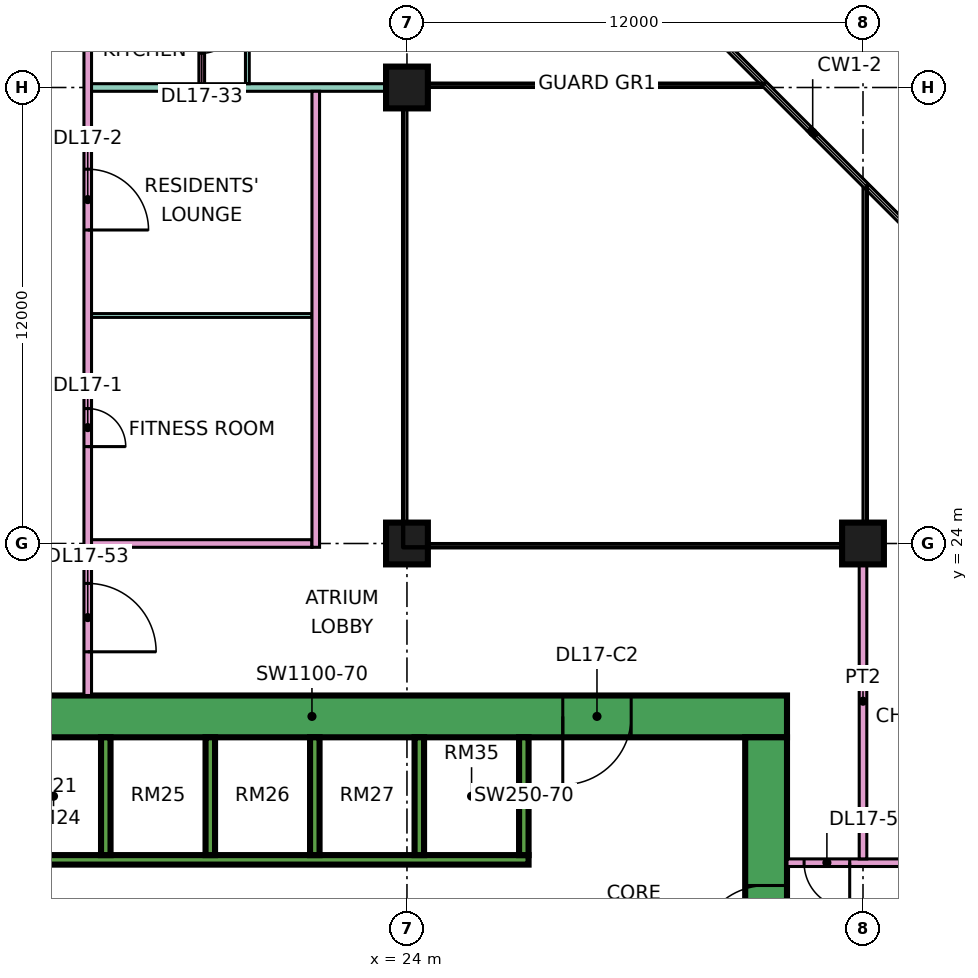
"""IFC4 building model, lengths in metres.
Left out: names, types, materials, properties, quantities, classifications, styles, units other than length and angle.
Written with IfcOpenShell. Run it as: python <this file> out.ifc"""

import sys

from ifc_helpers import new_model, si_unit, direction, frame, frame_2d, origin, origin_2d, place, context, subcontext, project, spatial, rectangle, extrude, element, fill, save


model = new_model("IFC4")
c1 = context("Model", 3, precision=1e-05, world=origin(), true_north=direction((0.0, 1.0)))
c2 = subcontext(c1, "Body", "Model", "MODEL_VIEW")
j1 = project(units=[si_unit("LENGTHUNIT", "METRE"), si_unit("PLANEANGLEUNIT", "RADIAN")], contexts=[c1])
p1 = place(None, origin())
s1 = spatial("IfcSite", under=j1, at=p1, CompositionType="ELEMENT")
p2 = place(p1, origin())
s2 = spatial("IfcBuilding", under=s1, at=p2, CompositionType="ELEMENT")
p3 = place(p2, frame((0.0, 0.0, 78.9)))
s3 = spatial("IfcBuildingStorey", under=s2, at=p3, CompositionType="ELEMENT", Elevation=78.9)
for number, where, z_axis, x_axis in (
    (1, (24.0, 24.0, 0.0), (0.0, 0.0, 1.0), (1.0, 0.0, 0.0)),
    (2, (24.0, 36.0, 0.0), (0.0, 0.0, 1.0), (1.0, 0.0, 0.0)),
    (3, (36.0, 24.0, 0.0), (0.0, 0.0, 1.0), (1.0, 0.0, 0.0)),
):
    element("IfcColumn", number, at=place(p3, frame(where, z_axis=z_axis, x_axis=x_axis)), inside=s3, PredefinedType="COLUMN", context=c2, shape_type="SweptSolid", body=[
        extrude(rectangle(XDim=1.1, YDim=1.1, at=origin_2d()), origin(), (0.0, 0.0, 1.0), 3.75),
    ])
p4 = place(p3, frame((9.0, 19.45, 0.0), z_axis=(0.0, 0.0, 1.0), x_axis=(1.0, 0.0, 0.0)))
e4 = element("IfcWall", 4, at=p4, inside=s3, PredefinedType="SHEAR", context=c2, shape_type="SweptSolid", body=[
    extrude(rectangle(XDim=25.0, YDim=1.1, at=frame_2d((12.5, 0.0))), origin(), (0.0, 0.0, 1.0), 3.75),
])
p5 = place(p4, frame((19.1, 0.0, 0.0)))
e5 = element("IfcOpeningElement", 5, at=p5, cuts=e4, PredefinedType="OPENING", context=c2, shape_type="SweptSolid", body=[
    extrude(rectangle(XDim=1.8, YDim=2.4, at=frame_2d((0.9, 1.2))), frame((0.0, 0.56, 0.0), z_axis=(0.0, -1.0, 0.0), x_axis=(1.0, 0.0, 0.0)), (0.0, 0.0, 1.0), 1.12),
])
p6 = place(p3, frame((33.45, 8.1, 0.0), z_axis=(0.0, 0.0, 1.0), x_axis=(0.0, 1.0, 0.0)))
e6 = element("IfcWall", 6, at=p6, inside=s3, PredefinedType="SHEAR", context=c2, shape_type="SweptSolid", body=[
    extrude(rectangle(XDim=10.8, YDim=1.1, at=frame_2d((5.4, 0.0))), origin(), (0.0, 0.0, 1.0), 3.75),
])
p7 = place(p6, frame((5.1, 0.0, 0.0)))
e7 = element("IfcOpeningElement", 7, at=p7, cuts=e6, PredefinedType="OPENING", context=c2, shape_type="SweptSolid", body=[
    extrude(rectangle(XDim=1.8, YDim=2.4, at=frame_2d((0.9, 1.2))), frame((0.0, 0.56, 0.0), z_axis=(0.0, -1.0, 0.0), x_axis=(1.0, 0.0, 0.0)), (0.0, 0.0, 1.0), 1.12),
])
p8 = place(p3, frame((13.45, 15.675, 0.0), z_axis=(0.0, 0.0, 1.0), x_axis=(1.0, 0.0, 0.0)))
e8 = element("IfcWall", 8, at=p8, inside=s3, PredefinedType="SHEAR", context=c2, shape_type="SweptSolid", body=[
    extrude(rectangle(XDim=13.75, YDim=0.25, at=frame_2d((6.875, 0.0))), origin(), (0.0, 0.0, 1.0), 3.75),
])
for number, where, z_axis, x_axis in (
    (9, (16.075, 15.8, 0.0), (0.0, 0.0, 1.0), (0.0, 1.0, 0.0)),
    (10, (18.825, 15.8, 0.0), (0.0, 0.0, 1.0), (0.0, 1.0, 0.0)),
    (11, (21.575, 15.8, 0.0), (0.0, 0.0, 1.0), (0.0, 1.0, 0.0)),
    (12, (24.325, 15.8, 0.0), (0.0, 0.0, 1.0), (0.0, 1.0, 0.0)),
    (13, (27.075, 15.8, 0.0), (0.0, 0.0, 1.0), (0.0, 1.0, 0.0)),
):
    element("IfcWall", number, at=place(p3, frame(where, z_axis=z_axis, x_axis=x_axis)), inside=s3, PredefinedType="SHEAR", context=c2, shape_type="SweptSolid", body=[
        extrude(rectangle(XDim=3.1, YDim=0.25, at=frame_2d((1.55, 0.0))), origin(), (0.0, 0.0, 1.0), 3.75),
    ])
p9 = place(p3, frame((15.6, 20.0, 0.0), z_axis=(0.0, 0.0, 1.0), x_axis=(0.0, 1.0, 0.0)))
e14 = element("IfcWall", 14, at=p9, inside=s3, PredefinedType="PARTITIONING", context=c2, shape_type="SweptSolid", body=[
    extrude(rectangle(XDim=27.775, YDim=0.2, at=frame_2d((13.887, 0.0))), origin(), (0.0, 0.0, 1.0), 3.35),
])
p10 = place(p9, frame((6.55, 0.0, 0.0)))
e15 = element("IfcOpeningElement", 15, at=p10, cuts=e14, PredefinedType="OPENING", context=c2, shape_type="SweptSolid", body=[
    extrude(rectangle(XDim=1.0, YDim=2.1, at=frame_2d((0.5, 1.05))), frame((0.0, 0.11, 0.0), z_axis=(0.0, -1.0, 0.0), x_axis=(1.0, 0.0, 0.0)), (0.0, 0.0, 1.0), 0.22),
])
p11 = place(p9, frame((12.25, 0.0, 0.0)))
e16 = element("IfcOpeningElement", 16, at=p11, cuts=e14, PredefinedType="OPENING", context=c2, shape_type="SweptSolid", body=[
    extrude(rectangle(XDim=1.6, YDim=2.1, at=frame_2d((0.8, 1.05))), frame((0.0, 0.11, 0.0), z_axis=(0.0, -1.0, 0.0), x_axis=(1.0, 0.0, 0.0)), (0.0, 0.0, 1.0), 0.22),
])
p12 = place(p9, frame((22.75, 0.0, 0.0)))
e17 = element("IfcOpeningElement", 17, at=p12, cuts=e14, PredefinedType="OPENING", context=c2, shape_type="SweptSolid", body=[
    extrude(rectangle(XDim=1.0, YDim=2.1, at=frame_2d((0.5, 1.05))), frame((0.0, 0.11, 0.0), z_axis=(0.0, -1.0, 0.0), x_axis=(1.0, 0.0, 0.0)), (0.0, 0.0, 1.0), 0.22),
])
p13 = place(p9, frame((1.15, 0.0, 0.0)))
e18 = element("IfcOpeningElement", 18, at=p13, cuts=e14, PredefinedType="OPENING", context=c2, shape_type="SweptSolid", body=[
    extrude(rectangle(XDim=1.8, YDim=2.1, at=frame_2d((0.9, 1.05))), frame((0.0, 0.11, 0.0), z_axis=(0.0, -1.0, 0.0), x_axis=(1.0, 0.0, 0.0)), (0.0, 0.0, 1.0), 0.22),
])
p14 = place(p9, frame((25.9, 0.0, 0.0)))
e19 = element("IfcOpeningElement", 19, at=p14, cuts=e14, PredefinedType="OPENING", context=c2, shape_type="SweptSolid", body=[
    extrude(rectangle(XDim=1.0, YDim=2.1, at=frame_2d((0.5, 1.05))), frame((0.0, 0.11, 0.0), z_axis=(0.0, -1.0, 0.0), x_axis=(1.0, 0.0, 0.0)), (0.0, 0.0, 1.0), 0.22),
])
p15 = place(p3, frame((15.7, 24.0, 0.0), z_axis=(0.0, 0.0, 1.0), x_axis=(1.0, 0.0, 0.0)))
e20 = element("IfcWall", 20, at=p15, inside=s3, PredefinedType="PARTITIONING", context=c2, shape_type="SweptSolid", body=[
    extrude(rectangle(XDim=5.8, YDim=0.2, at=frame_2d((2.9, 0.0))), origin(), (0.0, 0.0, 1.0), 3.35),
])
p16 = place(p3, frame((15.7, 30.0, 0.0), z_axis=(0.0, 0.0, 1.0), x_axis=(1.0, 0.0, 0.0)))
e21 = element("IfcWall", 21, at=p16, inside=s3, PredefinedType="PARTITIONING", context=c2, shape_type="SweptSolid", body=[
    extrude(rectangle(XDim=5.8, YDim=0.1, at=frame_2d((2.9, 0.0))), origin(), (0.0, 0.0, 1.0), 3.35),
])
p17 = place(p3, frame((15.7, 36.0, 0.0), z_axis=(0.0, 0.0, 1.0), x_axis=(1.0, 0.0, 0.0)))
e22 = element("IfcWall", 22, at=p17, inside=s3, PredefinedType="PARTITIONING", context=c2, shape_type="SweptSolid", body=[
    extrude(rectangle(XDim=8.3, YDim=0.2, at=frame_2d((4.15, 0.0))), origin(), (0.0, 0.0, 1.0), 3.35),
])
p18 = place(p3, frame((18.6, 36.1, 0.0), z_axis=(0.0, 0.0, 1.0), x_axis=(0.0, 1.0, 0.0)))
e23 = element("IfcWall", 23, at=p18, inside=s3, PredefinedType="PARTITIONING", context=c2, shape_type="SweptSolid", body=[
    extrude(rectangle(XDim=5.375, YDim=0.15, at=frame_2d((2.688, 0.0))), origin(), (0.0, 0.0, 1.0), 3.35),
])
p19 = place(p18, frame((3.6, 0.0, 0.0)))
e24 = element("IfcOpeningElement", 24, at=p19, cuts=e23, PredefinedType="OPENING", context=c2, shape_type="SweptSolid", body=[
    extrude(rectangle(XDim=0.8, YDim=2.1, at=frame_2d((0.4, 1.05))), frame((0.0, 0.085, 0.0), z_axis=(0.0, -1.0, 0.0), x_axis=(1.0, 0.0, 0.0)), (0.0, 0.0, 1.0), 0.17),
])
p20 = place(p18, frame((0.8, 0.0, 0.0)))
e25 = element("IfcOpeningElement", 25, at=p20, cuts=e23, PredefinedType="OPENING", context=c2, shape_type="SweptSolid", body=[
    extrude(rectangle(XDim=0.9, YDim=2.1, at=frame_2d((0.45, 1.05))), frame((0.0, 0.085, 0.0), z_axis=(0.0, -1.0, 0.0), x_axis=(1.0, 0.0, 0.0)), (0.0, 0.0, 1.0), 0.17),
])
p21 = place(p3, frame((19.8, 36.1, 0.0), z_axis=(0.0, 0.0, 1.0), x_axis=(0.0, 1.0, 0.0)))
e26 = element("IfcWall", 26, at=p21, inside=s3, PredefinedType="PARTITIONING", context=c2, shape_type="SweptSolid", body=[
    extrude(rectangle(XDim=5.95, YDim=0.1, at=frame_2d((2.975, 0.0))), origin(), (0.0, 0.0, 1.0), 3.35),
])
p22 = place(p21, frame((0.95, 0.0, 0.0)))
e27 = element("IfcOpeningElement", 27, at=p22, cuts=e26, PredefinedType="OPENING", context=c2, shape_type="SweptSolid", body=[
    extrude(rectangle(XDim=0.9, YDim=2.1, at=frame_2d((0.45, 1.05))), frame((0.0, 0.06, 0.0), z_axis=(0.0, -1.0, 0.0), x_axis=(1.0, 0.0, 0.0)), (0.0, 0.0, 1.0), 0.12),
])
p23 = place(p3, frame((21.6, 23.9, 0.0), z_axis=(0.0, 0.0, 1.0), x_axis=(0.0, 1.0, 0.0)))
e28 = element("IfcWall", 28, at=p23, inside=s3, PredefinedType="PARTITIONING", context=c2, shape_type="SweptSolid", body=[
    extrude(rectangle(XDim=12.0, YDim=0.2, at=frame_2d((6.0, 0.0))), origin(), (0.0, 0.0, 1.0), 3.35),
])
p24 = place(p3, frame((34.0, 15.6, 0.0), z_axis=(0.0, 0.0, 1.0), x_axis=(1.0, 0.0, 0.0)))
e29 = element("IfcWall", 29, at=p24, inside=s3, PredefinedType="PARTITIONING", context=c2, shape_type="SweptSolid", body=[
    extrude(rectangle(XDim=10.35, YDim=0.2, at=frame_2d((5.175, 0.0))), origin(), (0.0, 0.0, 1.0), 3.35),
])
p25 = place(p24, frame((5.6, 0.0, 0.0)))
e30 = element("IfcOpeningElement", 30, at=p25, cuts=e29, PredefinedType="OPENING", context=c2, shape_type="SweptSolid", body=[
    extrude(rectangle(XDim=1.0, YDim=2.1, at=frame_2d((0.5, 1.05))), frame((0.0, 0.11, 0.0), z_axis=(0.0, -1.0, 0.0), x_axis=(1.0, 0.0, 0.0)), (0.0, 0.0, 1.0), 0.22),
])
p26 = place(p24, frame((0.45, 0.0, 0.0)))
e31 = element("IfcOpeningElement", 31, at=p26, cuts=e29, PredefinedType="OPENING", context=c2, shape_type="SweptSolid", body=[
    extrude(rectangle(XDim=1.2, YDim=2.1, at=frame_2d((0.6, 1.05))), frame((0.0, 0.11, 0.0), z_axis=(0.0, -1.0, 0.0), x_axis=(1.0, 0.0, 0.0)), (0.0, 0.0, 1.0), 0.22),
])
p27 = place(p3, frame((36.0, 15.7, 0.0), z_axis=(0.0, 0.0, 1.0), x_axis=(0.0, 1.0, 0.0)))
e32 = element("IfcWall", 32, at=p27, inside=s3, PredefinedType="PARTITIONING", context=c2, shape_type="SweptSolid", body=[
    extrude(rectangle(XDim=8.3, YDim=0.2, at=frame_2d((4.15, 0.0))), origin(), (0.0, 0.0, 1.0), 3.35),
])
p28 = place(p7, origin())
e33 = element("IfcDoor", 33, at=p28, inside=s3, OperationType="DOUBLE_DOOR_SINGLE_SWING", PredefinedType="DOOR", context=c2, shape_type="SweptSolid", body=[
    extrude(rectangle(XDim=1.8, YDim=2.4, at=frame_2d((0.9, 1.2))), frame((0.0, 0.025, 0.0), z_axis=(0.0, -1.0, 0.0), x_axis=(1.0, 0.0, 0.0)), (0.0, 0.0, 1.0), 0.05),
])
fill(e7, e33)
p29 = place(p5, frame((1.8, 0.0, 0.0), z_axis=(0.0, 0.0, 1.0), x_axis=(-1.0, 0.0, 0.0)))
e34 = element("IfcDoor", 34, at=p29, inside=s3, OperationType="DOUBLE_DOOR_SINGLE_SWING", PredefinedType="DOOR", context=c2, shape_type="SweptSolid", body=[
    extrude(rectangle(XDim=1.8, YDim=2.4, at=frame_2d((0.9, 1.2))), frame((0.0, 0.025, 0.0), z_axis=(0.0, -1.0, 0.0), x_axis=(1.0, 0.0, 0.0)), (0.0, 0.0, 1.0), 0.05),
])
fill(e5, e34)
p30 = place(p10, frame((1.0, 0.0, 0.0), z_axis=(0.0, 0.0, 1.0), x_axis=(-1.0, 0.0, 0.0)))
e35 = element("IfcDoor", 35, at=p30, inside=s3, OperationType="SINGLE_SWING_LEFT", PredefinedType="DOOR", context=c2, shape_type="SweptSolid", body=[
    extrude(rectangle(XDim=1.0, YDim=2.1, at=frame_2d((0.5, 1.05))), frame((0.0, 0.025, 0.0), z_axis=(0.0, -1.0, 0.0), x_axis=(1.0, 0.0, 0.0)), (0.0, 0.0, 1.0), 0.05),
])
fill(e15, e35)
p31 = place(p11, frame((1.6, 0.0, 0.0), z_axis=(0.0, 0.0, 1.0), x_axis=(-1.0, 0.0, 0.0)))
e36 = element("IfcDoor", 36, at=p31, inside=s3, OperationType="DOUBLE_DOOR_SINGLE_SWING", PredefinedType="DOOR", context=c2, shape_type="SweptSolid", body=[
    extrude(rectangle(XDim=1.6, YDim=2.1, at=frame_2d((0.8, 1.05))), frame((0.0, 0.025, 0.0), z_axis=(0.0, -1.0, 0.0), x_axis=(1.0, 0.0, 0.0)), (0.0, 0.0, 1.0), 0.05),
])
fill(e16, e36)
p32 = place(p20, origin())
e37 = element("IfcDoor", 37, at=p32, inside=s3, OperationType="SINGLE_SWING_RIGHT", PredefinedType="DOOR", context=c2, shape_type="SweptSolid", body=[
    extrude(rectangle(XDim=0.9, YDim=2.1, at=frame_2d((0.45, 1.05))), frame((0.0, 0.025, 0.0), z_axis=(0.0, -1.0, 0.0), x_axis=(1.0, 0.0, 0.0)), (0.0, 0.0, 1.0), 0.05),
])
fill(e25, e37)
p33 = place(p26, origin())
e38 = element("IfcDoor", 38, at=p33, inside=s3, OperationType="SINGLE_SWING_RIGHT", PredefinedType="DOOR", context=c2, shape_type="SweptSolid", body=[
    extrude(rectangle(XDim=1.2, YDim=2.1, at=frame_2d((0.6, 1.05))), frame((0.0, 0.025, 0.0), z_axis=(0.0, -1.0, 0.0), x_axis=(1.0, 0.0, 0.0)), (0.0, 0.0, 1.0), 0.05),
])
fill(e31, e38)
p34 = place(p13, frame((1.8, 0.0, 0.0), z_axis=(0.0, 0.0, 1.0), x_axis=(-1.0, 0.0, 0.0)))
e39 = element("IfcDoor", 39, at=p34, inside=s3, OperationType="DOUBLE_DOOR_SINGLE_SWING", PredefinedType="DOOR", context=c2, shape_type="SweptSolid", body=[
    extrude(rectangle(XDim=1.8, YDim=2.1, at=frame_2d((0.9, 1.05))), frame((0.0, 0.025, 0.0), z_axis=(0.0, -1.0, 0.0), x_axis=(1.0, 0.0, 0.0)), (0.0, 0.0, 1.0), 0.05),
])
fill(e18, e39)
save(model, sys.argv[1])
